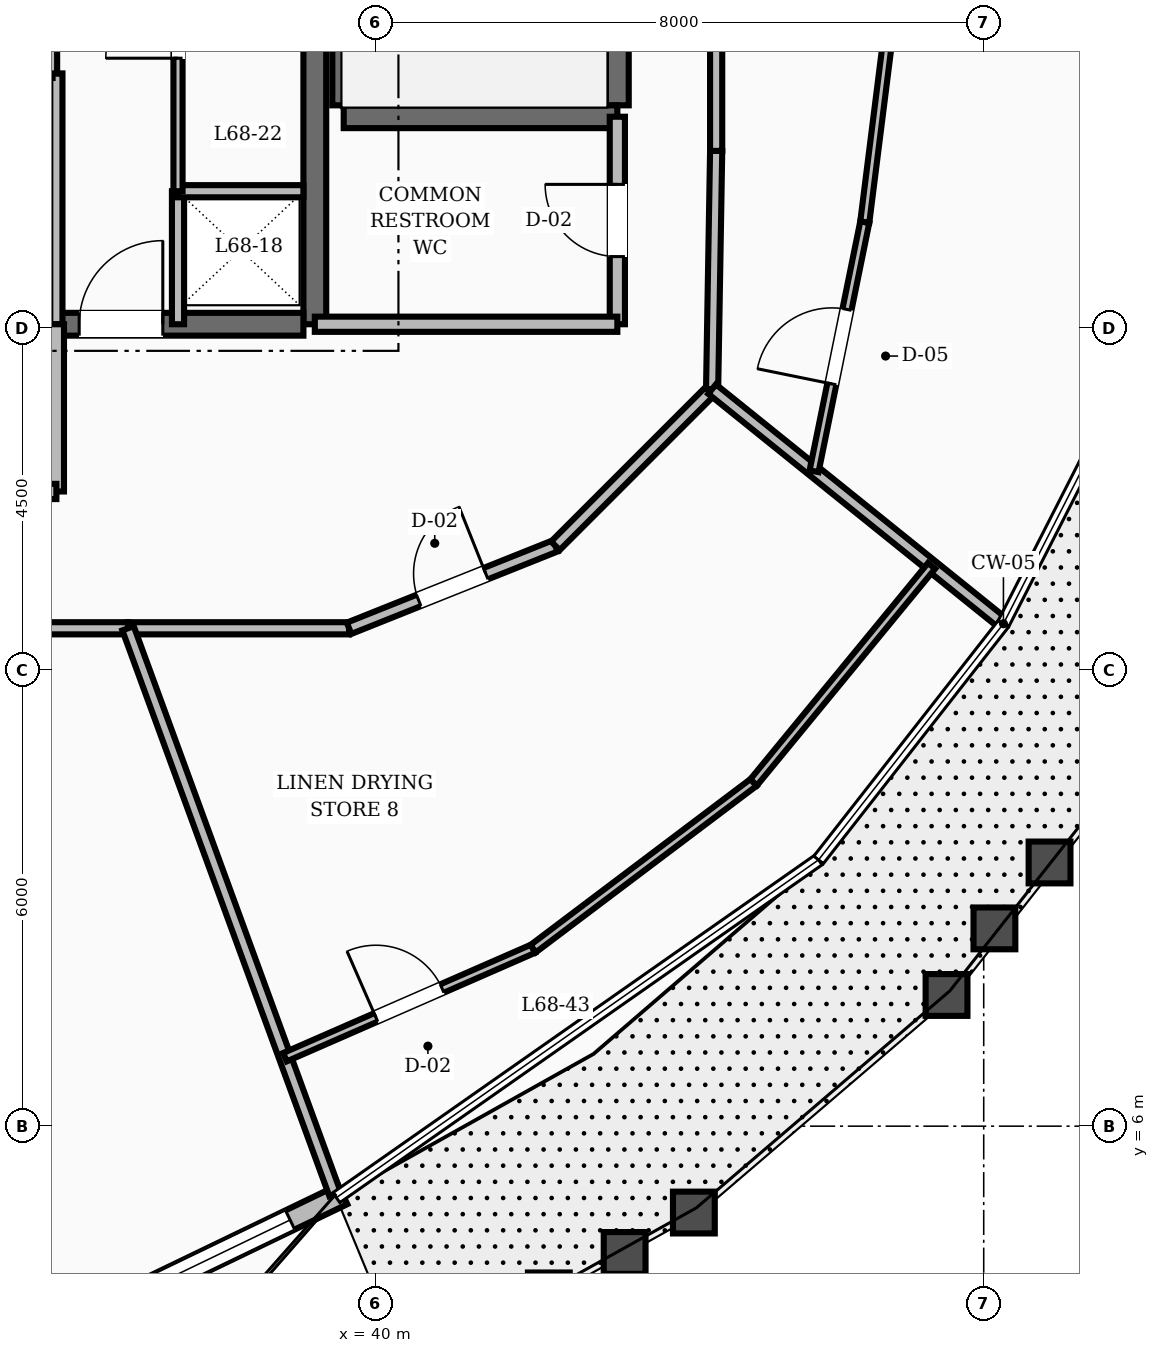
"""IFC4 building model, lengths in metres.
Left out: names, types, materials, properties, quantities, classifications, styles, units other than length and angle.
Written with IfcOpenShell. Run it as: python <this file> out.ifc"""

import sys

from ifc_helpers import new_model, si_unit, direction, frame, frame_2d, origin, place, context, subcontext, project, spatial, rectangle, extrude, element, fill, save


model = new_model("IFC4")
c1 = context("Model", 3, precision=1e-05, world=origin(), true_north=direction((0.0, 1.0)))
c2 = subcontext(c1, "Body", "Model", "MODEL_VIEW")
j1 = project(units=[si_unit("LENGTHUNIT", "METRE"), si_unit("PLANEANGLEUNIT", "RADIAN")], contexts=[c1])
p1 = place(None, origin())
s1 = spatial("IfcSite", under=j1, at=p1, CompositionType="ELEMENT")
p2 = place(p1, origin())
s2 = spatial("IfcBuilding", under=s1, at=p2, CompositionType="ELEMENT")
p3 = place(p2, frame((0.0, 0.0, 261.6)))
s3 = spatial("IfcBuildingStorey", under=s2, at=p3, CompositionType="ELEMENT", Elevation=261.6)
p4 = place(p3, frame((39.2, 16.55, 0.0), z_axis=(0.0, 0.0, 1.0), x_axis=(0.0, 1.0, 0.0)))
e1 = element("IfcWall", 1, at=p4, inside=s3, PredefinedType="SHEAR", context=c2, shape_type="SweptSolid", body=[
    extrude(rectangle(XDim=6.3, YDim=0.3, at=frame_2d((3.15, 0.0))), origin(), (0.0, 0.0, 1.0), 3.6),
])
p5 = place(p3, frame((35.8, 16.55, 0.0), z_axis=(0.0, 0.0, 1.0), x_axis=(1.0, 0.0, 0.0)))
e2 = element("IfcWall", 2, at=p5, inside=s3, PredefinedType="SHEAR", context=c2, shape_type="SweptSolid", body=[
    extrude(rectangle(XDim=3.25, YDim=0.3, at=frame_2d((1.625, 0.0))), origin(), (0.0, 0.0, 1.0), 3.6),
])
p6 = place(p5, frame((0.3, 0.0, 0.0)))
e3 = element("IfcOpeningElement", 3, at=p6, cuts=e2, PredefinedType="OPENING", context=c2, shape_type="SweptSolid", body=[
    extrude(rectangle(XDim=1.1, YDim=2.1, at=frame_2d((0.55, 1.05))), frame((0.0, 0.16, 0.0), z_axis=(0.0, -1.0, 0.0), x_axis=(1.0, 0.0, 0.0)), (0.0, 0.0, 1.0), 0.32),
])
for number, where, z_axis, x_axis in (
    (4, (43.18, 19.43, 0.0), (0.0, 0.0, 1.0), (0.0, 1.0, 0.0)),
    (5, (39.58, 19.43, 0.0), (0.0, 0.0, 1.0), (0.0, 1.0, 0.0)),
):
    element("IfcWall", number, at=place(p3, frame(where, z_axis=z_axis, x_axis=x_axis)), inside=s3, PredefinedType="SHEAR", context=c2, shape_type="SweptSolid", body=[
        extrude(rectangle(XDim=8.74, YDim=0.3, at=frame_2d((4.37, 0.0))), origin(), (0.0, 0.0, 1.0), 3.6),
    ])
p7 = place(p3, frame((39.58, 19.28, 0.0), z_axis=(0.0, 0.0, 1.0), x_axis=(1.0, 0.0, 0.0)))
e6 = element("IfcWall", 6, at=p7, inside=s3, PredefinedType="SHEAR", context=c2, shape_type="SweptSolid", body=[
    extrude(rectangle(XDim=3.6, YDim=0.3, at=frame_2d((1.8, 0.0))), origin(), (0.0, 0.0, 1.0), 3.6),
])
p8 = place(p3, frame((35.924, 3.344, 0.0), z_axis=(0.0, 0.0, 1.0), x_axis=(0.900783022648, 0.434269439529, 0.0)))
e7 = element("IfcWall", 7, at=p8, inside=s3, PredefinedType="STANDARD", context=c2, shape_type="SweptSolid", body=[
    extrude(rectangle(XDim=4.043, YDim=0.28, at=frame_2d((2.021, 0.0))), origin(), (0.0, 0.0, 1.0), 2.88),
])
p9 = place(p8, frame((0.676, 0.0, 0.8)))
e8 = element("IfcOpeningElement", 8, at=p9, cuts=e7, PredefinedType="OPENING", context=c2, shape_type="SweptSolid", body=[
    extrude(rectangle(XDim=2.6, YDim=1.65, at=frame_2d((1.3, 0.825))), frame((0.0, 0.15, 0.0), z_axis=(0.0, -1.0, 0.0), x_axis=(1.0, 0.0, 0.0)), (0.0, 0.0, 1.0), 0.3),
])
p10 = place(p3, frame((43.18, 16.55, 0.0), z_axis=(0.0, 0.0, 1.0), x_axis=(0.0, 1.0, 0.0)))
e9 = element("IfcWall", 9, at=p10, inside=s3, PredefinedType="SOLIDWALL", context=c2, shape_type="SweptSolid", body=[
    extrude(rectangle(XDim=2.73, YDim=0.2, at=frame_2d((1.365, 0.0))), origin(), (0.0, 0.0, 1.0), 2.87),
])
p11 = place(p10, frame((0.89, 0.0, 0.0)))
e10 = element("IfcOpeningElement", 10, at=p11, cuts=e9, PredefinedType="OPENING", context=c2, shape_type="SweptSolid", body=[
    extrude(rectangle(XDim=0.95, YDim=2.1, at=frame_2d((0.475, 1.05))), frame((0.0, 0.11, 0.0), z_axis=(0.0, -1.0, 0.0), x_axis=(1.0, 0.0, 0.0)), (0.0, 0.0, 1.0), 0.22),
])
p12 = place(p3, frame((39.2, 16.55, 0.0), z_axis=(0.0, 0.0, 1.0), x_axis=(1.0, 0.0, 0.0)))
e11 = element("IfcWall", 11, at=p12, inside=s3, PredefinedType="SOLIDWALL", context=c2, shape_type="SweptSolid", body=[
    extrude(rectangle(XDim=3.98, YDim=0.2, at=frame_2d((1.99, 0.0))), origin(), (0.0, 0.0, 1.0), 2.87),
])
p13 = place(p3, frame((35.8, 16.55, 0.0), z_axis=(0.0, 0.0, 1.0), x_axis=(0.0, 1.0, 0.0)))
e12 = element("IfcWall", 12, at=p13, inside=s3, PredefinedType="SOLIDWALL", context=c2, shape_type="SweptSolid", body=[
    extrude(rectangle(XDim=3.3, YDim=0.16, at=frame_2d((1.65, 0.0))), origin(), (0.0, 0.0, 1.0), 2.87),
])
p14 = place(p3, frame((37.4, 16.55, 0.0), z_axis=(0.0, 0.0, 1.0), x_axis=(0.0, 1.0, 0.0)))
e13 = element("IfcWall", 13, at=p14, inside=s3, PredefinedType="SOLIDWALL", context=c2, shape_type="SweptSolid", body=[
    extrude(rectangle(XDim=1.75, YDim=0.16, at=frame_2d((0.875, 0.0))), origin(), (0.0, 0.0, 1.0), 2.87),
])
p15 = place(p3, frame((35.8, 14.35, 0.0), z_axis=(0.0, 0.0, 1.0), x_axis=(0.0, 1.0, 0.0)))
e14 = element("IfcWall", 14, at=p15, inside=s3, PredefinedType="SOLIDWALL", context=c2, shape_type="SweptSolid", body=[
    extrude(rectangle(XDim=2.2, YDim=0.2, at=frame_2d((1.1, 0.0))), origin(), (0.0, 0.0, 1.0), 2.87),
])
p16 = place(p3, frame((28.2, 14.35, 0.0), z_axis=(0.0, 0.0, 1.0), x_axis=(1.0, 0.0, 0.0)))
e15 = element("IfcWall", 15, at=p16, inside=s3, PredefinedType="SOLIDWALL", context=c2, shape_type="SweptSolid", body=[
    extrude(rectangle(XDim=7.6, YDim=0.2, at=frame_2d((3.8, 0.0))), origin(), (0.0, 0.0, 1.0), 2.87),
])
p17 = place(p16, frame((3.2, 0.0, 0.0)))
e16 = element("IfcOpeningElement", 16, at=p17, cuts=e15, PredefinedType="OPENING", context=c2, shape_type="SweptSolid", body=[
    extrude(rectangle(XDim=1.2, YDim=2.1, at=frame_2d((0.6, 1.05))), frame((0.0, 0.11, 0.0), z_axis=(0.0, -1.0, 0.0), x_axis=(1.0, 0.0, 0.0)), (0.0, 0.0, 1.0), 0.22),
])
p18 = place(p3, frame((30.8, 19.85, 0.0), z_axis=(0.0, 0.0, 1.0), x_axis=(1.0, 0.0, 0.0)))
e17 = element("IfcWall", 17, at=p18, inside=s3, PredefinedType="PARTITIONING", context=c2, shape_type="SweptSolid", body=[
    extrude(rectangle(XDim=4.95, YDim=0.12, at=frame_2d((2.475, 0.0))), origin(), (0.0, 0.0, 1.0), 2.87),
])
p19 = place(p3, frame((35.75, 19.85, 0.0), z_axis=(0.0, 0.0, 1.0), x_axis=(0.0, 1.0, 0.0)))
e18 = element("IfcWall", 18, at=p19, inside=s3, PredefinedType="PARTITIONING", context=c2, shape_type="SweptSolid", body=[
    extrude(rectangle(XDim=2.83, YDim=0.12, at=frame_2d((1.415, 0.0))), origin(), (0.0, 0.0, 1.0), 2.87),
])
p20 = place(p3, frame((37.4, 18.3, 0.0), z_axis=(0.0, 0.0, 1.0), x_axis=(1.0, 0.0, 0.0)))
e19 = element("IfcWall", 19, at=p20, inside=s3, PredefinedType="SOLIDWALL", context=c2, shape_type="SweptSolid", body=[
    extrude(rectangle(XDim=1.65, YDim=0.16, at=frame_2d((0.825, 0.0))), origin(), (0.0, 0.0, 1.0), 2.87),
])
p21 = place(p3, frame((37.4, 18.3, 0.0), z_axis=(0.0, 0.0, 1.0), x_axis=(0.0, 1.0, 0.0)))
e20 = element("IfcWall", 20, at=p21, inside=s3, PredefinedType="PARTITIONING", context=c2, shape_type="SweptSolid", body=[
    extrude(rectangle(XDim=4.45, YDim=0.12, at=frame_2d((2.225, 0.0))), origin(), (0.0, 0.0, 1.0), 2.87),
])
p22 = place(p21, frame((1.75, 0.0, 0.0)))
e21 = element("IfcOpeningElement", 21, at=p22, cuts=e20, PredefinedType="OPENING", context=c2, shape_type="SweptSolid", body=[
    extrude(rectangle(XDim=0.95, YDim=2.1, at=frame_2d((0.475, 1.05))), frame((0.0, 0.07, 0.0), z_axis=(0.0, -1.0, 0.0), x_axis=(1.0, 0.0, 0.0)), (0.0, 0.0, 1.0), 0.14),
])
p23 = place(p3, frame((34.278, 12.55, 0.0), z_axis=(0.0, 0.0, 1.0), x_axis=(1.0, 0.0, 0.0)))
e22 = element("IfcWall", 22, at=p23, inside=s3, PredefinedType="SOLIDWALL", context=c2, shape_type="SweptSolid", body=[
    extrude(rectangle(XDim=2.465, YDim=0.16, at=frame_2d((1.232, 0.0))), origin(), (0.0, 0.0, 1.0), 2.87),
])
p24 = place(p3, frame((36.743, 12.55, 0.0), z_axis=(0.0, 0.0, 1.0), x_axis=(1.0, 0.0, 0.0)))
e23 = element("IfcWall", 23, at=p24, inside=s3, PredefinedType="SOLIDWALL", context=c2, shape_type="SweptSolid", body=[
    extrude(rectangle(XDim=2.908, YDim=0.16, at=frame_2d((1.454, 0.0))), origin(), (0.0, 0.0, 1.0), 2.87),
])
p25 = place(p3, frame((39.651, 12.55, 0.0), z_axis=(0.0, 0.0, 1.0), x_axis=(0.92856882165, 0.371160266542, 0.0)))
e24 = element("IfcWall", 24, at=p25, inside=s3, PredefinedType="SOLIDWALL", context=c2, shape_type="SweptSolid", body=[
    extrude(rectangle(XDim=2.923, YDim=0.16, at=frame_2d((1.461, 0.0))), origin(), (0.0, 0.0, 1.0), 2.87),
])
p26 = place(p25, frame((0.987, 0.0, 0.0)))
e25 = element("IfcOpeningElement", 25, at=p26, cuts=e24, PredefinedType="OPENING", context=c2, shape_type="SweptSolid", body=[
    extrude(rectangle(XDim=0.95, YDim=2.1, at=frame_2d((0.475, 1.05))), frame((0.0, 0.09, 0.0), z_axis=(0.0, -1.0, 0.0), x_axis=(1.0, 0.0, 0.0)), (0.0, 0.0, 1.0), 0.18),
])
p27 = place(p3, frame((42.365, 13.635, 0.0), z_axis=(0.0, 0.0, 1.0), x_axis=(0.707106781187, 0.707106781187, 0.0)))
e26 = element("IfcWall", 26, at=p27, inside=s3, PredefinedType="SOLIDWALL", context=c2, shape_type="SweptSolid", body=[
    extrude(rectangle(XDim=2.916, YDim=0.16, at=frame_2d((1.458, 0.0))), origin(), (0.0, 0.0, 1.0), 2.87),
])
p28 = place(p3, frame((44.427, 15.697, 0.0), z_axis=(0.0, 0.0, 1.0), x_axis=(0.016981035134, 0.999855811828, 0.0)))
e27 = element("IfcWall", 27, at=p28, inside=s3, PredefinedType="SOLIDWALL", context=c2, shape_type="SweptSolid", body=[
    extrude(rectangle(XDim=3.134, YDim=0.16, at=frame_2d((1.567, 0.0))), origin(), (0.0, 0.0, 1.0), 2.87),
])
p29 = place(p3, frame((44.48, 18.831, 0.0), z_axis=(0.0, 0.0, 1.0), x_axis=(0.0, 1.0, 0.0)))
e28 = element("IfcWall", 28, at=p29, inside=s3, PredefinedType="SOLIDWALL", context=c2, shape_type="SweptSolid", body=[
    extrude(rectangle(XDim=2.687, YDim=0.16, at=frame_2d((1.344, 0.0))), origin(), (0.0, 0.0, 1.0), 2.87),
])
p30 = place(p3, frame((44.427, 15.697, 0.0), z_axis=(0.0, 0.0, 1.0), x_axis=(0.778860000651, -0.627197815196, 0.0)))
e29 = element("IfcWall", 29, at=p30, inside=s3, PredefinedType="SOLIDWALL", context=c2, shape_type="SweptSolid", body=[
    extrude(rectangle(XDim=4.871, YDim=0.16, at=frame_2d((2.436, 0.0))), origin(), (0.0, 0.0, 1.0), 2.87),
])
p31 = place(p3, frame((45.768, 14.616, 0.0), z_axis=(0.0, 0.0, 1.0), x_axis=(0.199413694959, 0.979915393421, 0.0)))
e30 = element("IfcWall", 30, at=p31, inside=s3, PredefinedType="PARTITIONING", context=c2, shape_type="SweptSolid", body=[
    extrude(rectangle(XDim=3.345, YDim=0.12, at=frame_2d((1.672, 0.0))), origin(), (0.0, 0.0, 1.0), 2.87),
])
p32 = place(p31, frame((1.172, 0.0, 0.0)))
e31 = element("IfcOpeningElement", 31, at=p32, cuts=e30, PredefinedType="OPENING", context=c2, shape_type="SweptSolid", body=[
    extrude(rectangle(XDim=1.0, YDim=2.1, at=frame_2d((0.5, 1.05))), frame((0.0, 0.07, 0.0), z_axis=(0.0, -1.0, 0.0), x_axis=(1.0, 0.0, 0.0)), (0.0, 0.0, 1.0), 0.14),
])
p33 = place(p3, frame((46.435, 17.894, 0.0), z_axis=(0.0, 0.0, 1.0), x_axis=(0.12493122441, 0.992165404138, 0.0)))
e32 = element("IfcWall", 32, at=p33, inside=s3, PredefinedType="PARTITIONING", context=c2, shape_type="SweptSolid", body=[
    extrude(rectangle(XDim=3.117, YDim=0.12, at=frame_2d((1.559, 0.0))), origin(), (0.0, 0.0, 1.0), 2.87),
])
p34 = place(p3, frame((36.743, 12.55, 0.0), z_axis=(0.0, 0.0, 1.0), x_axis=(0.343621947863, -0.939108064574, 0.0)))
e33 = element("IfcWall", 33, at=p34, inside=s3, PredefinedType="SOLIDWALL", context=c2, shape_type="SweptSolid", body=[
    extrude(rectangle(XDim=7.926, YDim=0.16, at=frame_2d((3.963, 0.0))), origin(), (0.0, 0.0, 1.0), 2.87),
])
p35 = place(p3, frame((38.807, 6.907, 0.0), z_axis=(0.0, 0.0, 1.0), x_axis=(0.916231246175, 0.400649851532, 0.0)))
e34 = element("IfcWall", 34, at=p35, inside=s3, PredefinedType="PARTITIONING", context=c2, shape_type="SweptSolid", body=[
    extrude(rectangle(XDim=3.562, YDim=0.12, at=frame_2d((1.781, 0.0))), origin(), (0.0, 0.0, 1.0), 2.87),
])
p36 = place(p35, frame((1.306, 0.0, 0.0)))
e35 = element("IfcOpeningElement", 35, at=p36, cuts=e34, PredefinedType="OPENING", context=c2, shape_type="SweptSolid", body=[
    extrude(rectangle(XDim=0.95, YDim=2.1, at=frame_2d((0.475, 1.05))), frame((0.0, 0.07, 0.0), z_axis=(0.0, -1.0, 0.0), x_axis=(1.0, 0.0, 0.0)), (0.0, 0.0, 1.0), 0.14),
])
p37 = place(p3, frame((42.071, 8.334, 0.0), z_axis=(0.0, 0.0, 1.0), x_axis=(0.798457814545, 0.602050760644, 0.0)))
e36 = element("IfcWall", 36, at=p37, inside=s3, PredefinedType="PARTITIONING", context=c2, shape_type="SweptSolid", body=[
    extrude(rectangle(XDim=3.635, YDim=0.12, at=frame_2d((1.817, 0.0))), origin(), (0.0, 0.0, 1.0), 2.87),
])
p38 = place(p3, frame((44.973, 10.523, 0.0), z_axis=(0.0, 0.0, 1.0), x_axis=(0.634808611793, 0.772669415982, 0.0)))
e37 = element("IfcWall", 37, at=p38, inside=s3, PredefinedType="PARTITIONING", context=c2, shape_type="SweptSolid", body=[
    extrude(rectangle(XDim=3.687, YDim=0.12, at=frame_2d((1.844, 0.0))), origin(), (0.0, 0.0, 1.0), 2.87),
])
p39 = place(p9, origin())
e38 = element("IfcWindow", 38, at=p39, inside=s3, PartitioningType="SINGLE_PANEL", PredefinedType="WINDOW", context=c2, shape_type="SweptSolid", body=[
    extrude(rectangle(XDim=2.6, YDim=1.65, at=frame_2d((1.3, 0.825))), frame((0.0, 0.03, 0.0), z_axis=(0.0, -1.0, 0.0), x_axis=(1.0, 0.0, 0.0)), (0.0, 0.0, 1.0), 0.06),
])
fill(e8, e38)
p40 = place(p11, origin())
e39 = element("IfcDoor", 39, at=p40, inside=s3, OperationType="SINGLE_SWING_RIGHT", PredefinedType="DOOR", context=c2, shape_type="SweptSolid", body=[
    extrude(rectangle(XDim=0.95, YDim=2.1, at=frame_2d((0.475, 1.05))), frame((0.0, 0.025, 0.0), z_axis=(0.0, -1.0, 0.0), x_axis=(1.0, 0.0, 0.0)), (0.0, 0.0, 1.0), 0.05),
])
fill(e10, e39)
p41 = place(p6, origin())
e40 = element("IfcDoor", 40, at=p41, inside=s3, OperationType="SINGLE_SWING_RIGHT", PredefinedType="DOOR", context=c2, shape_type="SweptSolid", body=[
    extrude(rectangle(XDim=1.1, YDim=2.1, at=frame_2d((0.55, 1.05))), frame((0.0, 0.025, 0.0), z_axis=(0.0, -1.0, 0.0), x_axis=(1.0, 0.0, 0.0)), (0.0, 0.0, 1.0), 0.05),
])
fill(e3, e40)
p42 = place(p22, origin())
e41 = element("IfcDoor", 41, at=p42, inside=s3, OperationType="SINGLE_SWING_LEFT", PredefinedType="DOOR", context=c2, shape_type="SweptSolid", body=[
    extrude(rectangle(XDim=0.95, YDim=2.1, at=frame_2d((0.475, 1.05))), frame((0.0, 0.025, 0.0), z_axis=(0.0, -1.0, 0.0), x_axis=(1.0, 0.0, 0.0)), (0.0, 0.0, 1.0), 0.05),
])
fill(e21, e41)
p43 = place(p32, origin())
e42 = element("IfcDoor", 42, at=p43, inside=s3, OperationType="SINGLE_SWING_LEFT", PredefinedType="DOOR", context=c2, shape_type="SweptSolid", body=[
    extrude(rectangle(XDim=1.0, YDim=2.1, at=frame_2d((0.5, 1.05))), frame((0.0, 0.025, 0.0), z_axis=(0.0, -1.0, 0.0), x_axis=(1.0, 0.0, 0.0)), (0.0, 0.0, 1.0), 0.05),
])
fill(e31, e42)
p44 = place(p26, origin())
e43 = element("IfcDoor", 43, at=p44, inside=s3, OperationType="SINGLE_SWING_RIGHT", PredefinedType="DOOR", context=c2, shape_type="SweptSolid", body=[
    extrude(rectangle(XDim=0.95, YDim=2.1, at=frame_2d((0.475, 1.05))), frame((0.0, 0.025, 0.0), z_axis=(0.0, -1.0, 0.0), x_axis=(1.0, 0.0, 0.0)), (0.0, 0.0, 1.0), 0.05),
])
fill(e25, e43)
p45 = place(p36, origin())
e44 = element("IfcDoor", 44, at=p45, inside=s3, OperationType="SINGLE_SWING_LEFT", PredefinedType="DOOR", context=c2, shape_type="SweptSolid", body=[
    extrude(rectangle(XDim=0.95, YDim=2.1, at=frame_2d((0.475, 1.05))), frame((0.0, 0.025, 0.0), z_axis=(0.0, -1.0, 0.0), x_axis=(1.0, 0.0, 0.0)), (0.0, 0.0, 1.0), 0.05),
])
fill(e35, e44)
save(model, sys.argv[1])
